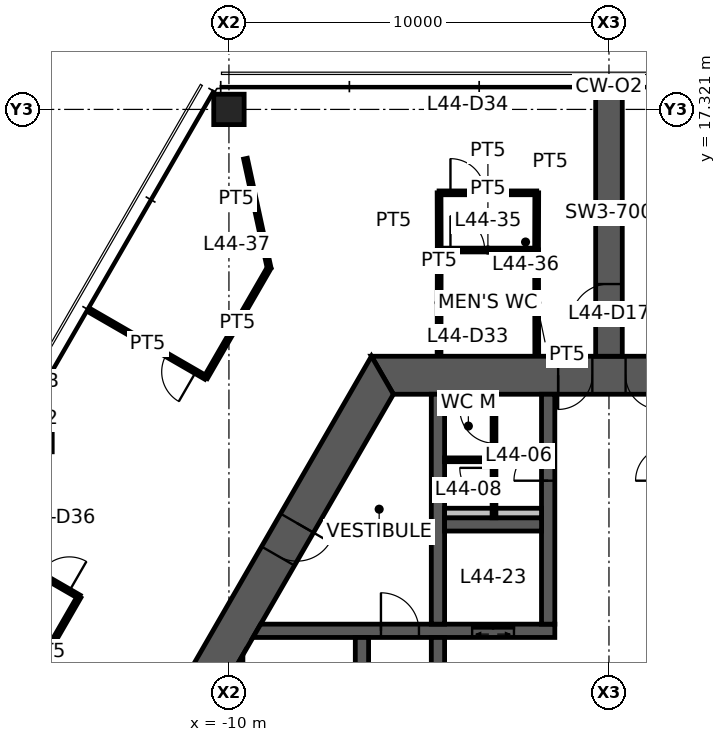
"""IFC4 building model, lengths in metres.
Left out: names, types, materials, properties, quantities, classifications, styles, units other than length and angle.
Written with IfcOpenShell. Run it as: python <this file> out.ifc"""

import sys

from ifc_helpers import new_model, si_unit, direction, frame, frame_2d, origin, origin_2d, place, context, subcontext, project, spatial, polyline, rectangle, hollow_rectangle, outline, extrude, element, fill, save


model = new_model("IFC4")
c1 = context("Model", 3, precision=1e-05, world=origin(), true_north=direction((0.0, 1.0)))
c2 = subcontext(c1, "Body", "Model", "MODEL_VIEW")
j1 = project(units=[si_unit("LENGTHUNIT", "METRE"), si_unit("PLANEANGLEUNIT", "RADIAN")], contexts=[c1])
p1 = place(None, origin())
s1 = spatial("IfcSite", under=j1, at=p1, CompositionType="ELEMENT")
p2 = place(p1, origin())
s2 = spatial("IfcBuilding", under=s1, at=p2, CompositionType="ELEMENT")
p3 = place(p2, frame((0.0, 0.0, 176.0)))
s3 = spatial("IfcBuildingStorey", under=s2, at=p3, CompositionType="ELEMENT", Elevation=176.0)
p4 = place(p3, frame((-10.0, 17.321, 0.0), z_axis=(0.0, 0.0, 1.0), x_axis=(1.0, 0.0, 0.0)))
e1 = element("IfcColumn", 1, at=p4, inside=s3, PredefinedType="COLUMN", context=c2, shape_type="SweptSolid", body=[
    extrude(hollow_rectangle(XDim=0.8, YDim=0.8, WallThickness=0.045, at=origin_2d()), origin(), (0.0, 0.0, 1.0), 3.9),
])
p5 = place(p3, frame((5.961, 10.325, 0.0), z_axis=(0.0, 0.0, 1.0), x_axis=(-1.0, 0.0, 0.0)))
e2 = element("IfcWall", 2, at=p5, inside=s3, PredefinedType="SHEAR", context=c2, shape_type="SweptSolid", body=[
    extrude(outline(polyline([(-0.289, -0.5), (4.624, -0.5), (5.523, -0.5), (6.399, -0.5), (7.299, -0.5), (12.211, -0.5), (11.634, 0.5), (7.299, 0.5), (6.399, 0.5), (5.523, 0.5), (4.624, 0.5), (0.289, 0.5), (-0.289, -0.5)])), origin(), (0.0, 0.0, 1.0), 3.9),
])
p6 = place(p5, frame((6.399, 0.0, 0.0)))
e3 = element("IfcOpeningElement", 3, at=p6, cuts=e2, PredefinedType="OPENING", context=c2, shape_type="SweptSolid", body=[
    extrude(rectangle(XDim=0.9, YDim=2.1, at=frame_2d((0.45, 1.05))), frame((0.0, 0.51, 0.0), z_axis=(0.0, -1.0, 0.0), x_axis=(1.0, 0.0, 0.0)), (0.0, 0.0, 1.0), 1.02),
])
p7 = place(p5, frame((4.624, 0.0, 0.0)))
e4 = element("IfcOpeningElement", 4, at=p7, cuts=e2, PredefinedType="OPENING", context=c2, shape_type="SweptSolid", body=[
    extrude(rectangle(XDim=0.9, YDim=2.1, at=frame_2d((0.45, 1.05))), frame((0.0, 0.51, 0.0), z_axis=(0.0, -1.0, 0.0), x_axis=(1.0, 0.0, 0.0)), (0.0, 0.0, 1.0), 1.02),
])
p8 = place(p3, frame((-5.961, 10.325, 0.0), z_axis=(0.0, 0.0, 1.0), x_axis=(-0.500004296715, -0.866022923061, 0.0)))
e5 = element("IfcWall", 5, at=p8, inside=s3, PredefinedType="SHEAR", context=c2, shape_type="SweptSolid", body=[
    extrude(outline(polyline([(-0.289, -0.5), (4.494, -0.5), (5.494, -0.5), (12.211, -0.5), (11.634, 0.5), (5.494, 0.5), (4.494, 0.5), (0.289, 0.5), (-0.289, -0.5)])), origin(), (0.0, 0.0, 1.0), 3.9),
])
p9 = place(p8, frame((4.494, 0.0, 0.0)))
e6 = element("IfcOpeningElement", 6, at=p9, cuts=e5, PredefinedType="OPENING", context=c2, shape_type="SweptSolid", body=[
    extrude(rectangle(XDim=1.0, YDim=2.1, at=frame_2d((0.5, 1.05))), frame((0.0, 0.51, 0.0), z_axis=(0.0, -1.0, 0.0), x_axis=(1.0, 0.0, 0.0)), (0.0, 0.0, 1.0), 1.02),
])
p10 = place(p3, frame((0.0, 10.825, 0.0), z_axis=(0.0, 0.0, 1.0), x_axis=(0.0, 1.0, 0.0)))
e7 = element("IfcWall", 7, at=p10, inside=s3, PredefinedType="SHEAR", context=c2, shape_type="SweptSolid", body=[
    extrude(rectangle(XDim=6.946, YDim=0.7, at=frame_2d((3.473, 0.0))), origin(), (0.0, 0.0, 1.0), 3.9),
])
p11 = place(p10, frame((0.9, 0.0, 0.0)))
e8 = element("IfcOpeningElement", 8, at=p11, cuts=e7, PredefinedType="OPENING", context=c2, shape_type="SweptSolid", body=[
    extrude(rectangle(XDim=1.0, YDim=2.1, at=frame_2d((0.5, 1.05))), frame((0.0, 0.36, 0.0), z_axis=(0.0, -1.0, 0.0), x_axis=(1.0, 0.0, 0.0)), (0.0, 0.0, 1.0), 0.72),
])
p12 = place(p3, frame((-9.266, 3.6, 0.0), z_axis=(0.0, 0.0, 1.0), x_axis=(1.0, 0.0, 0.0)))
e9 = element("IfcWall", 9, at=p12, inside=s3, PredefinedType="SHEAR", context=c2, shape_type="SweptSolid", body=[
    extrude(outline(polyline([(-0.101, -0.175), (3.266, -0.175), (4.266, -0.175), (5.667, -0.175), (6.767, -0.175), (7.841, -0.175), (7.841, 0.175), (6.767, 0.175), (5.667, 0.175), (4.266, 0.175), (3.266, 0.175), (0.101, 0.175), (-0.101, -0.175)])), origin(), (0.0, 0.0, 1.0), 3.9),
])
p13 = place(p12, frame((3.266, 0.0, 0.0)))
e10 = element("IfcOpeningElement", 10, at=p13, cuts=e9, PredefinedType="OPENING", context=c2, shape_type="SweptSolid", body=[
    extrude(rectangle(XDim=1.0, YDim=2.1, at=frame_2d((0.5, 1.05))), frame((0.0, 0.185, 0.0), z_axis=(0.0, -1.0, 0.0), x_axis=(1.0, 0.0, 0.0)), (0.0, 0.0, 1.0), 0.37),
])
p14 = place(p12, frame((5.667, 0.0, 0.0)))
e11 = element("IfcOpeningElement", 11, at=p14, cuts=e9, PredefinedType="OPENING", context=c2, shape_type="SweptSolid", body=[
    extrude(rectangle(XDim=1.1, YDim=2.1, at=frame_2d((0.55, 1.05))), frame((0.0, 0.185, 0.0), z_axis=(0.0, -1.0, 0.0), x_axis=(1.0, 0.0, 0.0)), (0.0, 0.0, 1.0), 0.37),
])
p15 = place(p3, frame((-1.6, 3.775, 0.0), z_axis=(0.0, 0.0, 1.0), x_axis=(0.0, 1.0, 0.0)))
e12 = element("IfcWall", 12, at=p15, inside=s3, PredefinedType="SHEAR", context=c2, shape_type="SweptSolid", body=[
    extrude(rectangle(XDim=6.05, YDim=0.35, at=frame_2d((3.025, 0.0))), origin(), (0.0, 0.0, 1.0), 3.9),
])
p16 = place(p15, frame((3.775, 0.0, 0.0)))
e13 = element("IfcOpeningElement", 13, at=p16, cuts=e12, PredefinedType="OPENING", context=c2, shape_type="SweptSolid", body=[
    extrude(rectangle(XDim=0.9, YDim=2.1, at=frame_2d((0.45, 1.05))), frame((0.0, 0.185, 0.0), z_axis=(0.0, -1.0, 0.0), x_axis=(1.0, 0.0, 0.0)), (0.0, 0.0, 1.0), 0.37),
])
p17 = place(p3, frame((-4.5, -3.425, 0.0), z_axis=(0.0, 0.0, 1.0), x_axis=(0.0, 1.0, 0.0)))
e14 = element("IfcWall", 14, at=p17, inside=s3, PredefinedType="SHEAR", context=c2, shape_type="SweptSolid", body=[
    extrude(rectangle(XDim=6.85, YDim=0.35, at=frame_2d((3.425, 0.0))), origin(), (0.0, 0.0, 1.0), 3.9),
])
p18 = place(p17, frame((2.925, 0.0, 0.0)))
e15 = element("IfcOpeningElement", 15, at=p18, cuts=e14, PredefinedType="OPENING", context=c2, shape_type="SweptSolid", body=[
    extrude(rectangle(XDim=1.0, YDim=2.1, at=frame_2d((0.5, 1.05))), frame((0.0, 0.185, 0.0), z_axis=(0.0, -1.0, 0.0), x_axis=(1.0, 0.0, 0.0)), (0.0, 0.0, 1.0), 0.37),
])
p19 = place(p3, frame((-6.5, -3.425, 0.0), z_axis=(0.0, 0.0, 1.0), x_axis=(0.0, 1.0, 0.0)))
e16 = element("IfcWall", 16, at=p19, inside=s3, PredefinedType="SHEAR", context=c2, shape_type="SweptSolid", body=[
    extrude(rectangle(XDim=6.85, YDim=0.35, at=frame_2d((3.425, 0.0))), origin(), (0.0, 0.0, 1.0), 3.9),
])
p20 = place(p19, frame((0.1, 0.0, 0.0)))
e17 = element("IfcOpeningElement", 17, at=p20, cuts=e16, PredefinedType="OPENING", context=c2, shape_type="SweptSolid", body=[
    extrude(rectangle(XDim=1.0, YDim=2.1, at=frame_2d((0.5, 1.05))), frame((0.0, 0.185, 0.0), z_axis=(0.0, -1.0, 0.0), x_axis=(1.0, 0.0, 0.0)), (0.0, 0.0, 1.0), 0.37),
])
p21 = place(p3, frame((-4.5, 3.775, 0.0), z_axis=(0.0, 0.0, 1.0), x_axis=(0.0, 1.0, 0.0)))
e18 = element("IfcWall", 18, at=p21, inside=s3, PredefinedType="SHEAR", context=c2, shape_type="SweptSolid", body=[
    extrude(rectangle(XDim=6.05, YDim=0.35, at=frame_2d((3.025, 0.0))), origin(), (0.0, 0.0, 1.0), 3.9),
])
p22 = place(p3, frame((-4.325, 6.4, 0.0), z_axis=(0.0, 0.0, 1.0), x_axis=(1.0, 0.0, 0.0)))
e19 = element("IfcWall", 19, at=p22, inside=s3, PredefinedType="SHEAR", context=c2, shape_type="SweptSolid", body=[
    extrude(rectangle(XDim=2.55, YDim=0.35, at=frame_2d((1.275, 0.0))), origin(), (0.0, 0.0, 1.0), 3.9),
])
p23 = place(p3, frame((-9.808, -2.662, 0.0), z_axis=(0.0, 0.0, 1.0), x_axis=(0.0, 1.0, 0.0)))
e20 = element("IfcWall", 20, at=p23, inside=s3, PredefinedType="SHEAR", context=c2, shape_type="SweptSolid", body=[
    extrude(outline(polyline([(-0.303, -0.175), (5.628, -0.175), (5.021, 0.175), (0.303, 0.175), (-0.303, -0.175)])), origin(), (0.0, 0.0, 1.0), 3.9),
])
p24 = place(p3, frame((-4.325, 6.7, 0.0), z_axis=(0.0, 0.0, 1.0), x_axis=(1.0, 0.0, 0.0)))
e21 = element("IfcWall", 21, at=p24, inside=s3, PredefinedType="PLUMBINGWALL", context=c2, shape_type="SweptSolid", body=[
    extrude(rectangle(XDim=2.55, YDim=0.25, at=frame_2d((1.275, 0.0))), origin(), (0.0, 0.0, 1.0), 3.9),
])
p25 = place(p3, frame((-3.025, 6.575, 0.0), z_axis=(0.0, 0.0, 1.0), x_axis=(0.0, 1.0, 0.0)))
e22 = element("IfcWall", 22, at=p25, inside=s3, PredefinedType="PARTITIONING", context=c2, shape_type="SweptSolid", body=[
    extrude(rectangle(XDim=3.25, YDim=0.1, at=frame_2d((1.625, 0.0))), origin(), (0.0, 0.0, 1.0), 2.95),
])
p26 = place(p25, frame((1.962, 0.0, 0.0)))
e23 = element("IfcOpeningElement", 23, at=p26, cuts=e22, PredefinedType="OPENING", context=c2, shape_type="SweptSolid", body=[
    extrude(rectangle(XDim=0.9, YDim=2.1, at=frame_2d((0.45, 1.05))), frame((0.0, 0.06, 0.0), z_axis=(0.0, -1.0, 0.0), x_axis=(1.0, 0.0, 0.0)), (0.0, 0.0, 1.0), 0.12),
])
p27 = place(p25, frame((0.413, 0.0, 0.0)))
e24 = element("IfcOpeningElement", 24, at=p27, cuts=e22, PredefinedType="OPENING", context=c2, shape_type="SweptSolid", body=[
    extrude(rectangle(XDim=0.9, YDim=2.1, at=frame_2d((0.45, 1.05))), frame((0.0, 0.06, 0.0), z_axis=(0.0, -1.0, 0.0), x_axis=(1.0, 0.0, 0.0)), (0.0, 0.0, 1.0), 0.12),
])
p28 = place(p3, frame((-3.075, 8.1, 0.0), z_axis=(0.0, 0.0, 1.0), x_axis=(-1.0, 0.0, 0.0)))
e25 = element("IfcWall", 25, at=p28, inside=s3, PredefinedType="PARTITIONING", context=c2, shape_type="SweptSolid", body=[
    extrude(rectangle(XDim=1.25, YDim=0.1, at=frame_2d((0.625, 0.0))), origin(), (0.0, 0.0, 1.0), 2.95),
])
p29 = place(p3, frame((-4.471, 13.62, 0.0), z_axis=(0.0, 0.0, 1.0), x_axis=(1.0, 0.0, 0.0)))
e26 = element("IfcWall", 26, at=p29, inside=s3, PredefinedType="PARTITIONING", context=c2, shape_type="SweptSolid", body=[
    extrude(rectangle(XDim=2.571, YDim=0.1, at=frame_2d((1.286, 0.0))), origin(), (0.0, 0.0, 1.0), 2.95),
])
p30 = place(p29, frame((0.3, 0.0, 0.0)))
e27 = element("IfcOpeningElement", 27, at=p30, cuts=e26, PredefinedType="OPENING", context=c2, shape_type="SweptSolid", body=[
    extrude(rectangle(XDim=0.9, YDim=2.1, at=frame_2d((0.45, 1.05))), frame((0.0, 0.06, 0.0), z_axis=(0.0, -1.0, 0.0), x_axis=(1.0, 0.0, 0.0)), (0.0, 0.0, 1.0), 0.12),
])
for number, where, z_axis, x_axis in (
    (28, (-4.471, 10.845, 0.0), (0.0, 0.0, 1.0), (0.002, 1.0, 0.0)),
    (29, (-1.905, 13.625, 0.0), (0.0, 0.0, 1.0), (0.002, -1.0, 0.0)),
):
    element("IfcWall", number, at=place(p3, frame(where, z_axis=z_axis, x_axis=x_axis)), inside=s3, PredefinedType="PARTITIONING", context=c2, shape_type="SweptSolid", body=[
        extrude(rectangle(XDim=2.78, YDim=0.1, at=frame_2d((1.39, 0.0))), origin(), (0.0, 0.0, 1.0), 2.95),
    ])
p31 = place(p3, frame((-4.471, 15.125, 0.0), z_axis=(0.0, 0.0, 1.0), x_axis=(1.0, 0.0, 0.0)))
e30 = element("IfcWall", 30, at=p31, inside=s3, PredefinedType="PARTITIONING", context=c2, shape_type="SweptSolid", body=[
    extrude(rectangle(XDim=2.571, YDim=0.1, at=frame_2d((1.286, 0.0))), origin(), (0.0, 0.0, 1.0), 2.95),
])
p32 = place(p31, frame((0.3, 0.0, 0.0)))
e31 = element("IfcOpeningElement", 31, at=p32, cuts=e30, PredefinedType="OPENING", context=c2, shape_type="SweptSolid", body=[
    extrude(rectangle(XDim=0.9, YDim=2.1, at=frame_2d((0.45, 1.05))), frame((0.0, 0.06, 0.0), z_axis=(0.0, -1.0, 0.0), x_axis=(1.0, 0.0, 0.0)), (0.0, 0.0, 1.0), 0.12),
])
for number, where, z_axis, x_axis in (
    (32, (-4.466, 13.625, 0.0), (0.0, 0.0, 1.0), (-0.003, 1.0, 0.0)),
    (33, (-1.9, 15.125, 0.0), (0.0, 0.0, 1.0), (-0.003, -1.0, 0.0)),
):
    element("IfcWall", number, at=place(p3, frame(where, z_axis=z_axis, x_axis=x_axis)), inside=s3, PredefinedType="PARTITIONING", context=c2, shape_type="SweptSolid", body=[
        extrude(rectangle(XDim=1.5, YDim=0.1, at=frame_2d((0.75, 0.0))), origin(), (0.0, 0.0, 1.0), 2.95),
    ])
p33 = place(p3, frame((-10.61, 10.264, 0.0), z_axis=(0.0, 0.0, 1.0), x_axis=(-0.86601282795, 0.500021781351, 0.0)))
e34 = element("IfcWall", 34, at=p33, inside=s3, PredefinedType="PARTITIONING", context=c2, shape_type="SweptSolid", body=[
    extrude(rectangle(XDim=3.53, YDim=0.1, at=frame_2d((1.765, 0.0))), origin(), (0.0, 0.0, 1.0), 2.95),
])
p34 = place(p33, frame((0.3, 0.0, 0.0)))
e35 = element("IfcOpeningElement", 35, at=p34, cuts=e34, PredefinedType="OPENING", context=c2, shape_type="SweptSolid", body=[
    extrude(rectangle(XDim=0.9, YDim=2.1, at=frame_2d((0.45, 1.05))), frame((0.0, 0.06, 0.0), z_axis=(0.0, -1.0, 0.0), x_axis=(1.0, 0.0, 0.0)), (0.0, 0.0, 1.0), 0.12),
])
p35 = place(p3, frame((-9.564, 16.024, 0.0), z_axis=(0.0, 0.0, 1.0), x_axis=(0.211116290139, -0.977460951669, 0.0)))
e36 = element("IfcWall", 36, at=p35, inside=s3, PredefinedType="PARTITIONING", context=c2, shape_type="SweptSolid", body=[
    extrude(rectangle(XDim=2.941, YDim=0.1, at=frame_2d((1.47, 0.0))), origin(), (0.0, 0.0, 1.0), 2.95),
])
p36 = place(p3, frame((-8.943, 13.149, 0.0), z_axis=(0.0, 0.0, 1.0), x_axis=(-0.500189695295, -0.86591585545, 0.0)))
e37 = element("IfcWall", 37, at=p36, inside=s3, PredefinedType="PARTITIONING", context=c2, shape_type="SweptSolid", body=[
    extrude(rectangle(XDim=3.332, YDim=0.1, at=frame_2d((1.666, 0.0))), origin(), (0.0, 0.0, 1.0), 2.95),
])
p37 = place(p3, frame((-16.976, 6.248, 0.0), z_axis=(0.0, 0.0, 1.0), x_axis=(0.866001150353, -0.500042005822, 0.0)))
e38 = element("IfcWall", 38, at=p37, inside=s3, PredefinedType="PARTITIONING", context=c2, shape_type="SweptSolid", body=[
    extrude(rectangle(XDim=3.505, YDim=0.1, at=frame_2d((1.752, 0.0))), origin(), (0.0, 0.0, 1.0), 2.95),
])
p38 = place(p37, frame((2.305, 0.0, 0.0)))
e39 = element("IfcOpeningElement", 39, at=p38, cuts=e38, PredefinedType="OPENING", context=c2, shape_type="SweptSolid", body=[
    extrude(rectangle(XDim=0.9, YDim=2.1, at=frame_2d((0.45, 1.05))), frame((0.0, 0.06, 0.0), z_axis=(0.0, -1.0, 0.0), x_axis=(1.0, 0.0, 0.0)), (0.0, 0.0, 1.0), 0.12),
])
p39 = place(p3, frame((-13.941, 4.495, 0.0), z_axis=(0.0, 0.0, 1.0), x_axis=(-0.500033344505, -0.86600615147, 0.0)))
e40 = element("IfcWall", 40, at=p39, inside=s3, PredefinedType="PARTITIONING", context=c2, shape_type="SweptSolid", body=[
    extrude(rectangle(XDim=3.331, YDim=0.1, at=frame_2d((1.666, 0.0))), origin(), (0.0, 0.0, 1.0), 2.95),
])
p40 = place(p3, frame((0.0, 17.771, 0.0), z_axis=(0.0, 0.0, 1.0), x_axis=(0.0, 1.0, 0.0)))
e41 = element("IfcWall", 41, at=p40, inside=s3, PredefinedType="PARTITIONING", context=c2, shape_type="SweptSolid", body=[
    extrude(rectangle(XDim=0.08, YDim=0.175, at=frame_2d((0.04, 0.0))), origin(), (0.0, 0.0, 1.0), 3.9),
])
p41 = place(p6, origin())
e42 = element("IfcDoor", 42, at=p41, inside=s3, OperationType="SINGLE_SWING_RIGHT", PredefinedType="DOOR", context=c2, shape_type="SweptSolid", body=[
    extrude(rectangle(XDim=0.9, YDim=2.1, at=frame_2d((0.45, 1.05))), frame((0.0, 0.025, 0.0), z_axis=(0.0, -1.0, 0.0), x_axis=(1.0, 0.0, 0.0)), (0.0, 0.0, 1.0), 0.05),
])
fill(e3, e42)
p42 = place(p7, origin())
e43 = element("IfcDoor", 43, at=p42, inside=s3, OperationType="SINGLE_SWING_LEFT", PredefinedType="DOOR", context=c2, shape_type="SweptSolid", body=[
    extrude(rectangle(XDim=0.9, YDim=2.1, at=frame_2d((0.45, 1.05))), frame((0.0, 0.025, 0.0), z_axis=(0.0, -1.0, 0.0), x_axis=(1.0, 0.0, 0.0)), (0.0, 0.0, 1.0), 0.05),
])
fill(e4, e43)
p43 = place(p9, origin())
e44 = element("IfcDoor", 44, at=p43, inside=s3, OperationType="SINGLE_SWING_LEFT", PredefinedType="DOOR", context=c2, shape_type="SweptSolid", body=[
    extrude(rectangle(XDim=1.0, YDim=2.1, at=frame_2d((0.5, 1.05))), frame((0.0, 0.025, 0.0), z_axis=(0.0, -1.0, 0.0), x_axis=(1.0, 0.0, 0.0)), (0.0, 0.0, 1.0), 0.05),
])
fill(e6, e44)
p44 = place(p13, origin())
e45 = element("IfcDoor", 45, at=p44, inside=s3, OperationType="SINGLE_SWING_LEFT", PredefinedType="DOOR", context=c2, shape_type="SweptSolid", body=[
    extrude(rectangle(XDim=1.0, YDim=2.1, at=frame_2d((0.5, 1.05))), frame((0.0, 0.025, 0.0), z_axis=(0.0, -1.0, 0.0), x_axis=(1.0, 0.0, 0.0)), (0.0, 0.0, 1.0), 0.05),
])
fill(e10, e45)
p45 = place(p16, origin())
e46 = element("IfcDoor", 46, at=p45, inside=s3, OperationType="SINGLE_SWING_LEFT", PredefinedType="DOOR", context=c2, shape_type="SweptSolid", body=[
    extrude(rectangle(XDim=0.9, YDim=2.1, at=frame_2d((0.45, 1.05))), frame((0.0, 0.025, 0.0), z_axis=(0.0, -1.0, 0.0), x_axis=(1.0, 0.0, 0.0)), (0.0, 0.0, 1.0), 0.05),
])
fill(e13, e46)
p46 = place(p11, origin())
e47 = element("IfcDoor", 47, at=p46, inside=s3, OperationType="SINGLE_SWING_LEFT", PredefinedType="DOOR", context=c2, shape_type="SweptSolid", body=[
    extrude(rectangle(XDim=1.0, YDim=2.1, at=frame_2d((0.5, 1.05))), frame((0.0, 0.025, 0.0), z_axis=(0.0, -1.0, 0.0), x_axis=(1.0, 0.0, 0.0)), (0.0, 0.0, 1.0), 0.05),
])
fill(e8, e47)
p47 = place(p26, origin())
e48 = element("IfcDoor", 48, at=p47, inside=s3, OperationType="SINGLE_SWING_RIGHT", PredefinedType="DOOR", context=c2, shape_type="SweptSolid", body=[
    extrude(rectangle(XDim=0.9, YDim=2.1, at=frame_2d((0.45, 1.05))), frame((0.0, 0.025, 0.0), z_axis=(0.0, -1.0, 0.0), x_axis=(1.0, 0.0, 0.0)), (0.0, 0.0, 1.0), 0.05),
])
fill(e23, e48)
p48 = place(p27, origin())
e49 = element("IfcDoor", 49, at=p48, inside=s3, OperationType="SINGLE_SWING_RIGHT", PredefinedType="DOOR", context=c2, shape_type="SweptSolid", body=[
    extrude(rectangle(XDim=0.9, YDim=2.1, at=frame_2d((0.45, 1.05))), frame((0.0, 0.025, 0.0), z_axis=(0.0, -1.0, 0.0), x_axis=(1.0, 0.0, 0.0)), (0.0, 0.0, 1.0), 0.05),
])
fill(e24, e49)
p49 = place(p30, origin())
e50 = element("IfcDoor", 50, at=p49, inside=s3, OperationType="SINGLE_SWING_LEFT", PredefinedType="DOOR", context=c2, shape_type="SweptSolid", body=[
    extrude(rectangle(XDim=0.9, YDim=2.1, at=frame_2d((0.45, 1.05))), frame((0.0, 0.025, 0.0), z_axis=(0.0, -1.0, 0.0), x_axis=(1.0, 0.0, 0.0)), (0.0, 0.0, 1.0), 0.05),
])
fill(e27, e50)
p50 = place(p32, origin())
e51 = element("IfcDoor", 51, at=p50, inside=s3, OperationType="SINGLE_SWING_LEFT", PredefinedType="DOOR", context=c2, shape_type="SweptSolid", body=[
    extrude(rectangle(XDim=0.9, YDim=2.1, at=frame_2d((0.45, 1.05))), frame((0.0, 0.025, 0.0), z_axis=(0.0, -1.0, 0.0), x_axis=(1.0, 0.0, 0.0)), (0.0, 0.0, 1.0), 0.05),
])
fill(e31, e51)
p51 = place(p34, origin())
e52 = element("IfcDoor", 52, at=p51, inside=s3, OperationType="SINGLE_SWING_LEFT", PredefinedType="DOOR", context=c2, shape_type="SweptSolid", body=[
    extrude(rectangle(XDim=0.9, YDim=2.1, at=frame_2d((0.45, 1.05))), frame((0.0, 0.025, 0.0), z_axis=(0.0, -1.0, 0.0), x_axis=(1.0, 0.0, 0.0)), (0.0, 0.0, 1.0), 0.05),
])
fill(e35, e52)
p52 = place(p38, origin())
e53 = element("IfcDoor", 53, at=p52, inside=s3, OperationType="SINGLE_SWING_RIGHT", PredefinedType="DOOR", context=c2, shape_type="SweptSolid", body=[
    extrude(rectangle(XDim=0.9, YDim=2.1, at=frame_2d((0.45, 1.05))), frame((0.0, 0.025, 0.0), z_axis=(0.0, -1.0, 0.0), x_axis=(1.0, 0.0, 0.0)), (0.0, 0.0, 1.0), 0.05),
])
fill(e39, e53)
p53 = place(p14, origin())
e54 = element("IfcDoor", 54, at=p53, inside=s3, OperationType="DOUBLE_DOOR_SLIDING", PredefinedType="DOOR", context=c2, shape_type="SweptSolid", body=[
    extrude(rectangle(XDim=1.1, YDim=2.1, at=frame_2d((0.55, 1.05))), frame((0.0, 0.025, 0.0), z_axis=(0.0, -1.0, 0.0), x_axis=(1.0, 0.0, 0.0)), (0.0, 0.0, 1.0), 0.05),
])
fill(e11, e54)
save(model, sys.argv[1])
